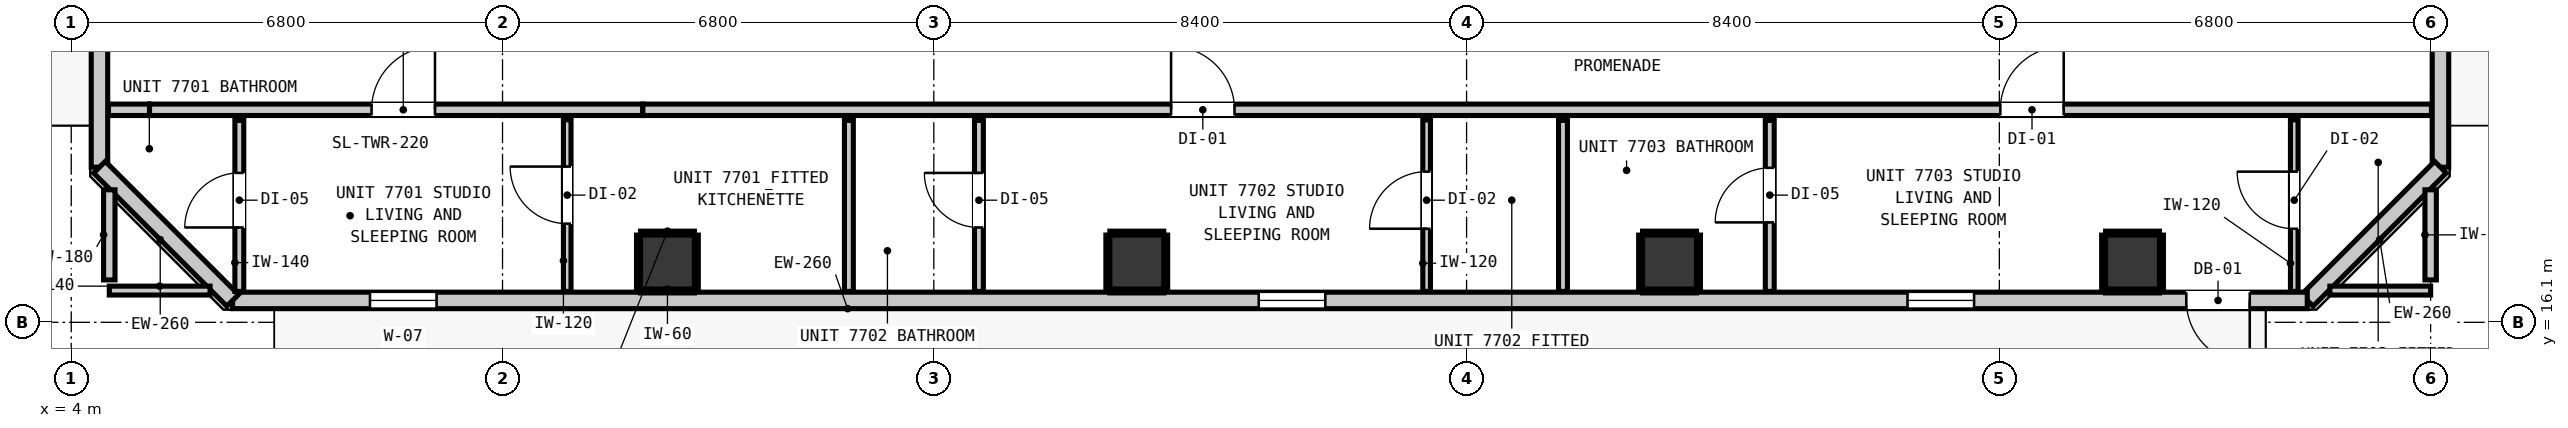
"""IFC4 building model, lengths in metres.
Left out: names, types, materials, properties, quantities, classifications, styles, units other than length and angle.
Written with IfcOpenShell. Run it as: python <this file> out.ifc"""

import sys

from ifc_helpers import new_model, si_unit, direction, frame, frame_2d, origin, origin_2d, place, context, subcontext, project, spatial, rectangle, extrude, element, fill, save


model = new_model("IFC4")
c1 = context("Model", 3, precision=1e-05, world=origin(), true_north=direction((0.0, 1.0)))
c2 = subcontext(c1, "Body", "Model", "MODEL_VIEW")
j1 = project(units=[si_unit("LENGTHUNIT", "METRE"), si_unit("PLANEANGLEUNIT", "RADIAN")], contexts=[c1])
p1 = place(None, origin())
s1 = spatial("IfcSite", under=j1, at=p1, CompositionType="ELEMENT")
p2 = place(p1, origin())
s2 = spatial("IfcBuilding", under=s1, at=p2, CompositionType="ELEMENT")
p3 = place(p2, frame((0.0, 0.0, 265.56)))
s3 = spatial("IfcBuildingStorey", under=s2, at=p3, CompositionType="ELEMENT", Elevation=265.56)
for number, where, z_axis, x_axis in (
    (1, (13.4, 17.05, 0.0), (0.0, 0.0, 1.0), (1.0, 0.0, 0.0)),
    (2, (20.8, 17.05, 0.0), (0.0, 0.0, 1.0), (1.0, 0.0, 0.0)),
    (3, (29.2, 17.05, 0.0), (0.0, 0.0, 1.0), (1.0, 0.0, 0.0)),
    (4, (36.5, 17.05, 0.0), (0.0, 0.0, 1.0), (1.0, 0.0, 0.0)),
):
    element("IfcColumn", number, at=place(p3, frame(where, z_axis=z_axis, x_axis=x_axis)), inside=s3, PredefinedType="COLUMN", context=c2, shape_type="SweptSolid", body=[
        extrude(rectangle(XDim=0.85, YDim=0.85, at=origin_2d()), origin(), (0.0, 0.0, 1.0), 3.32),
    ])
p4 = place(p3, frame((4.445, 18.545, 0.0), z_axis=(0.0, 0.0, 1.0), x_axis=(0.0, 1.0, 0.0)))
e5 = element("IfcWall", 5, at=p4, inside=s3, PredefinedType="STANDARD", context=c2, shape_type="SweptSolid", body=[
    extrude(rectangle(XDim=30.31, YDim=0.26, at=frame_2d((15.155, 0.0))), origin(), (0.0, 0.0, 1.0), 3.1),
])
p5 = place(p4, frame((4.434, 0.0, 0.0)))
e6 = element("IfcOpeningElement", 6, at=p5, cuts=e5, PredefinedType="OPENING", context=c2, shape_type="SweptSolid", body=[
    extrude(rectangle(XDim=1.0, YDim=2.15, at=frame_2d((0.5, 1.075))), frame((0.0, 0.14, 0.0), z_axis=(0.0, -1.0, 0.0), x_axis=(1.0, 0.0, 0.0)), (0.0, 0.0, 1.0), 0.28),
])
p6 = place(p4, frame((28.241, 0.0, 0.85)))
e7 = element("IfcOpeningElement", 7, at=p6, cuts=e5, PredefinedType="OPENING", context=c2, shape_type="SweptSolid", body=[
    extrude(rectangle(XDim=1.05, YDim=1.65, at=frame_2d((0.525, 0.825))), frame((0.0, 0.14, 0.0), z_axis=(0.0, -1.0, 0.0), x_axis=(1.0, 0.0, 0.0)), (0.0, 0.0, 1.0), 0.28),
])
p7 = place(p4, frame((15.98, 0.0, 0.85)))
e8 = element("IfcOpeningElement", 8, at=p7, cuts=e5, PredefinedType="OPENING", context=c2, shape_type="SweptSolid", body=[
    extrude(rectangle(XDim=1.05, YDim=1.65, at=frame_2d((0.525, 0.825))), frame((0.0, 0.14, 0.0), z_axis=(0.0, -1.0, 0.0), x_axis=(1.0, 0.0, 0.0)), (0.0, 0.0, 1.0), 0.28),
])
p8 = place(p3, frame((41.355, 48.855, 0.0), z_axis=(0.0, 0.0, 1.0), x_axis=(0.0, -1.0, 0.0)))
e9 = element("IfcWall", 9, at=p8, inside=s3, PredefinedType="STANDARD", context=c2, shape_type="SweptSolid", body=[
    extrude(rectangle(XDim=30.31, YDim=0.26, at=frame_2d((15.155, 0.0))), origin(), (0.0, 0.0, 1.0), 3.1),
])
p9 = place(p8, frame((0.91, 0.0, 0.0)))
e10 = element("IfcOpeningElement", 10, at=p9, cuts=e9, PredefinedType="OPENING", context=c2, shape_type="SweptSolid", body=[
    extrude(rectangle(XDim=1.0, YDim=2.15, at=frame_2d((0.5, 1.075))), frame((0.0, 0.14, 0.0), z_axis=(0.0, -1.0, 0.0), x_axis=(1.0, 0.0, 0.0)), (0.0, 0.0, 1.0), 0.28),
])
p10 = place(p8, frame((3.932, 0.0, 0.85)))
e11 = element("IfcOpeningElement", 11, at=p10, cuts=e9, PredefinedType="OPENING", context=c2, shape_type="SweptSolid", body=[
    extrude(rectangle(XDim=1.05, YDim=1.65, at=frame_2d((0.525, 0.825))), frame((0.0, 0.14, 0.0), z_axis=(0.0, -1.0, 0.0), x_axis=(1.0, 0.0, 0.0)), (0.0, 0.0, 1.0), 0.28),
])
p11 = place(p3, frame((41.355, 18.545, 0.0), z_axis=(0.0, 0.0, 1.0), x_axis=(-0.707147883682, -0.707065676302, 0.0)))
e12 = element("IfcWall", 12, at=p11, inside=s3, PredefinedType="STANDARD", context=c2, shape_type="SweptSolid", body=[
    extrude(rectangle(XDim=2.97, YDim=0.26, at=frame_2d((1.485, 0.0))), origin(), (0.0, 0.0, 1.0), 3.1),
])
p12 = place(p3, frame((39.255, 16.445, 0.0), z_axis=(0.0, 0.0, 1.0), x_axis=(-1.0, 0.0, 0.0)))
e13 = element("IfcWall", 13, at=p12, inside=s3, PredefinedType="STANDARD", context=c2, shape_type="SweptSolid", body=[
    extrude(rectangle(XDim=32.71, YDim=0.26, at=frame_2d((16.355, 0.0))), origin(), (0.0, 0.0, 1.0), 3.1),
])
p13 = place(p12, frame((0.907, 0.0, 0.0)))
e14 = element("IfcOpeningElement", 14, at=p13, cuts=e13, PredefinedType="OPENING", context=c2, shape_type="SweptSolid", body=[
    extrude(rectangle(XDim=1.0, YDim=2.15, at=frame_2d((0.5, 1.075))), frame((0.0, 0.14, 0.0), z_axis=(0.0, -1.0, 0.0), x_axis=(1.0, 0.0, 0.0)), (0.0, 0.0, 1.0), 0.28),
])
p14 = place(p12, frame((29.495, 0.0, 0.85)))
e15 = element("IfcOpeningElement", 15, at=p14, cuts=e13, PredefinedType="OPENING", context=c2, shape_type="SweptSolid", body=[
    extrude(rectangle(XDim=1.05, YDim=1.65, at=frame_2d((0.525, 0.825))), frame((0.0, 0.14, 0.0), z_axis=(0.0, -1.0, 0.0), x_axis=(1.0, 0.0, 0.0)), (0.0, 0.0, 1.0), 0.28),
])
p15 = place(p12, frame((15.482, 0.0, 0.85)))
e16 = element("IfcOpeningElement", 16, at=p15, cuts=e13, PredefinedType="OPENING", context=c2, shape_type="SweptSolid", body=[
    extrude(rectangle(XDim=1.05, YDim=1.65, at=frame_2d((0.525, 0.825))), frame((0.0, 0.14, 0.0), z_axis=(0.0, -1.0, 0.0), x_axis=(1.0, 0.0, 0.0)), (0.0, 0.0, 1.0), 0.28),
])
p16 = place(p12, frame((5.253, 0.0, 0.85)))
e17 = element("IfcOpeningElement", 17, at=p16, cuts=e13, PredefinedType="OPENING", context=c2, shape_type="SweptSolid", body=[
    extrude(rectangle(XDim=1.05, YDim=1.65, at=frame_2d((0.525, 0.825))), frame((0.0, 0.14, 0.0), z_axis=(0.0, -1.0, 0.0), x_axis=(1.0, 0.0, 0.0)), (0.0, 0.0, 1.0), 0.28),
])
p17 = place(p3, frame((6.545, 16.445, 0.0), z_axis=(0.0, 0.0, 1.0), x_axis=(-0.707106781187, 0.707106781187, 0.0)))
e18 = element("IfcWall", 18, at=p17, inside=s3, PredefinedType="STANDARD", context=c2, shape_type="SweptSolid", body=[
    extrude(rectangle(XDim=2.97, YDim=0.26, at=frame_2d((1.485, 0.0))), origin(), (0.0, 0.0, 1.0), 3.1),
])
p18 = place(p3, frame((4.587, 19.45, 0.0), z_axis=(0.0, 0.0, 1.0), x_axis=(1.0, 0.0, 0.0)))
e19 = element("IfcWall", 19, at=p18, inside=s3, PredefinedType="PARTITIONING", context=c2, shape_type="SweptSolid", body=[
    extrude(rectangle(XDim=0.647, YDim=0.18, at=frame_2d((0.323, 0.0))), origin(), (0.0, 0.0, 1.0), 3.1),
])
p19 = place(p3, frame((5.234, 19.45, 0.0), z_axis=(0.0, 0.0, 1.0), x_axis=(1.0, 0.0, 0.0)))
e20 = element("IfcWall", 20, at=p19, inside=s3, PredefinedType="PARTITIONING", context=c2, shape_type="SweptSolid", body=[
    extrude(rectangle(XDim=7.778, YDim=0.18, at=frame_2d((3.889, 0.0))), origin(), (0.0, 0.0, 1.0), 2.477),
])
p20 = place(p19, frame((3.501, 0.0, 0.0)))
e21 = element("IfcOpeningElement", 21, at=p20, cuts=e20, PredefinedType="OPENING", context=c2, shape_type="SweptSolid", body=[
    extrude(rectangle(XDim=1.0, YDim=2.15, at=frame_2d((0.5, 1.075))), frame((0.0, 0.1, 0.0), z_axis=(0.0, -1.0, 0.0), x_axis=(1.0, 0.0, 0.0)), (0.0, 0.0, 1.0), 0.2),
])
p21 = place(p3, frame((13.012, 19.45, 0.0), z_axis=(0.0, 0.0, 1.0), x_axis=(1.0, 0.0, 0.0)))
e22 = element("IfcWall", 22, at=p21, inside=s3, PredefinedType="PARTITIONING", context=c2, shape_type="SweptSolid", body=[
    extrude(rectangle(XDim=28.201, YDim=0.18, at=frame_2d((14.101, 0.0))), origin(), (0.0, 0.0, 1.0), 3.1),
])
p22 = place(p21, frame((8.329, 0.0, 0.0)))
e23 = element("IfcOpeningElement", 23, at=p22, cuts=e22, PredefinedType="OPENING", context=c2, shape_type="SweptSolid", body=[
    extrude(rectangle(XDim=1.0, YDim=2.15, at=frame_2d((0.5, 1.075))), frame((0.0, 0.1, 0.0), z_axis=(0.0, -1.0, 0.0), x_axis=(1.0, 0.0, 0.0)), (0.0, 0.0, 1.0), 0.2),
])
p23 = place(p21, frame((21.403, 0.0, 0.0)))
e24 = element("IfcOpeningElement", 24, at=p23, cuts=e22, PredefinedType="OPENING", context=c2, shape_type="SweptSolid", body=[
    extrude(rectangle(XDim=1.0, YDim=2.15, at=frame_2d((0.5, 1.075))), frame((0.0, 0.1, 0.0), z_axis=(0.0, -1.0, 0.0), x_axis=(1.0, 0.0, 0.0)), (0.0, 0.0, 1.0), 0.2),
])
for number, where, z_axis, x_axis in (
    (25, (4.6, 16.6, 0.0), (0.0, 0.0, 1.0), (1.0, 0.0, 0.0)),
    (26, (39.611, 16.6, 0.0), (0.0, 0.0, 1.0), (1.0, 0.0, 0.0)),
):
    element("IfcWall", number, at=place(p3, frame(where, z_axis=z_axis, x_axis=x_axis)), inside=s3, PredefinedType="PARTITIONING", context=c2, shape_type="SweptSolid", body=[
        extrude(rectangle(XDim=1.589, YDim=0.14, at=frame_2d((0.794, 0.0))), origin(), (0.0, 0.0, 1.0), 3.1),
    ])
for number, where, z_axis, x_axis in (
    (27, (4.6, 16.768, 0.0), (0.0, 0.0, 1.0), (0.0, 1.0, 0.0)),
    (28, (41.2, 16.768, 0.0), (0.0, 0.0, 1.0), (0.0, 1.0, 0.0)),
):
    element("IfcWall", number, at=place(p3, frame(where, z_axis=z_axis, x_axis=x_axis)), inside=s3, PredefinedType="PARTITIONING", context=c2, shape_type="SweptSolid", body=[
        extrude(rectangle(XDim=1.421, YDim=0.18, at=frame_2d((0.71, 0.0))), origin(), (0.0, 0.0, 1.0), 3.1),
    ])
p24 = place(p3, frame((6.65, 16.587, 0.0), z_axis=(0.0, 0.0, 1.0), x_axis=(0.0, 1.0, 0.0)))
e29 = element("IfcWall", 29, at=p24, inside=s3, PredefinedType="PARTITIONING", context=c2, shape_type="SweptSolid", body=[
    extrude(rectangle(XDim=2.695, YDim=0.14, at=frame_2d((1.348, 0.0))), origin(), (0.0, 0.0, 1.0), 3.1),
])
p25 = place(p24, frame((1.008, 0.0, 0.0)))
e30 = element("IfcOpeningElement", 30, at=p25, cuts=e29, PredefinedType="OPENING", context=c2, shape_type="SweptSolid", body=[
    extrude(rectangle(XDim=0.86, YDim=2.02, at=frame_2d((0.43, 1.01))), frame((0.0, 0.08, 0.0), z_axis=(0.0, -1.0, 0.0), x_axis=(1.0, 0.0, 0.0)), (0.0, 0.0, 1.0), 0.16),
])
p26 = place(p3, frame((16.261, 16.587, 0.0), z_axis=(0.0, 0.0, 1.0), x_axis=(0.0, 1.0, 0.0)))
e31 = element("IfcWall", 31, at=p26, inside=s3, PredefinedType="PARTITIONING", context=c2, shape_type="SweptSolid", body=[
    extrude(rectangle(XDim=2.695, YDim=0.14, at=frame_2d((1.348, 0.0))), origin(), (0.0, 0.0, 1.0), 3.1),
])
p27 = place(p3, frame((18.311, 16.587, 0.0), z_axis=(0.0, 0.0, 1.0), x_axis=(0.0, 1.0, 0.0)))
e32 = element("IfcWall", 32, at=p27, inside=s3, PredefinedType="PARTITIONING", context=c2, shape_type="SweptSolid", body=[
    extrude(rectangle(XDim=2.695, YDim=0.14, at=frame_2d((1.348, 0.0))), origin(), (0.0, 0.0, 1.0), 3.1),
])
p28 = place(p27, frame((1.008, 0.0, 0.0)))
e33 = element("IfcOpeningElement", 33, at=p28, cuts=e32, PredefinedType="OPENING", context=c2, shape_type="SweptSolid", body=[
    extrude(rectangle(XDim=0.86, YDim=2.02, at=frame_2d((0.43, 1.01))), frame((0.0, 0.08, 0.0), z_axis=(0.0, -1.0, 0.0), x_axis=(1.0, 0.0, 0.0)), (0.0, 0.0, 1.0), 0.16),
])
p29 = place(p3, frame((27.52, 16.587, 0.0), z_axis=(0.0, 0.0, 1.0), x_axis=(0.0, 1.0, 0.0)))
e34 = element("IfcWall", 34, at=p29, inside=s3, PredefinedType="PARTITIONING", context=c2, shape_type="SweptSolid", body=[
    extrude(rectangle(XDim=2.695, YDim=0.14, at=frame_2d((1.348, 0.0))), origin(), (0.0, 0.0, 1.0), 3.1),
])
p30 = place(p3, frame((30.78, 16.587, 0.0), z_axis=(0.0, 0.0, 1.0), x_axis=(0.0, 1.0, 0.0)))
e35 = element("IfcWall", 35, at=p30, inside=s3, PredefinedType="PARTITIONING", context=c2, shape_type="SweptSolid", body=[
    extrude(rectangle(XDim=2.695, YDim=0.14, at=frame_2d((1.348, 0.0))), origin(), (0.0, 0.0, 1.0), 3.1),
])
p31 = place(p30, frame((1.088, 0.0, 0.0)))
e36 = element("IfcOpeningElement", 36, at=p31, cuts=e35, PredefinedType="OPENING", context=c2, shape_type="SweptSolid", body=[
    extrude(rectangle(XDim=0.86, YDim=2.02, at=frame_2d((0.43, 1.01))), frame((0.0, 0.08, 0.0), z_axis=(0.0, -1.0, 0.0), x_axis=(1.0, 0.0, 0.0)), (0.0, 0.0, 1.0), 0.16),
])
p32 = place(p3, frame((11.82, 16.587, 0.0), z_axis=(0.0, 0.0, 1.0), x_axis=(0.0, 1.0, 0.0)))
e37 = element("IfcWall", 37, at=p32, inside=s3, PredefinedType="PARTITIONING", context=c2, shape_type="SweptSolid", body=[
    extrude(rectangle(XDim=2.705, YDim=0.12, at=frame_2d((1.353, 0.0))), origin(), (0.0, 0.0, 1.0), 3.1),
])
p33 = place(p32, frame((1.068, 0.0, 0.0)))
e38 = element("IfcOpeningElement", 38, at=p33, cuts=e37, PredefinedType="OPENING", context=c2, shape_type="SweptSolid", body=[
    extrude(rectangle(XDim=0.9, YDim=2.1, at=frame_2d((0.45, 1.05))), frame((0.0, 0.07, 0.0), z_axis=(0.0, -1.0, 0.0), x_axis=(1.0, 0.0, 0.0)), (0.0, 0.0, 1.0), 0.14),
])
p34 = place(p3, frame((25.37, 16.587, 0.0), z_axis=(0.0, 0.0, 1.0), x_axis=(0.0, 1.0, 0.0)))
e39 = element("IfcWall", 39, at=p34, inside=s3, PredefinedType="PARTITIONING", context=c2, shape_type="SweptSolid", body=[
    extrude(rectangle(XDim=2.705, YDim=0.12, at=frame_2d((1.353, 0.0))), origin(), (0.0, 0.0, 1.0), 3.1),
])
p35 = place(p34, frame((0.988, 0.0, 0.0)))
e40 = element("IfcOpeningElement", 40, at=p35, cuts=e39, PredefinedType="OPENING", context=c2, shape_type="SweptSolid", body=[
    extrude(rectangle(XDim=0.9, YDim=2.1, at=frame_2d((0.45, 1.05))), frame((0.0, 0.07, 0.0), z_axis=(0.0, -1.0, 0.0), x_axis=(1.0, 0.0, 0.0)), (0.0, 0.0, 1.0), 0.14),
])
p36 = place(p3, frame((39.05, 16.587, 0.0), z_axis=(0.0, 0.0, 1.0), x_axis=(0.0, 1.0, 0.0)))
e41 = element("IfcWall", 41, at=p36, inside=s3, PredefinedType="PARTITIONING", context=c2, shape_type="SweptSolid", body=[
    extrude(rectangle(XDim=2.705, YDim=0.12, at=frame_2d((1.353, 0.0))), origin(), (0.0, 0.0, 1.0), 3.1),
])
p37 = place(p36, frame((0.988, 0.0, 0.0)))
e42 = element("IfcOpeningElement", 42, at=p37, cuts=e41, PredefinedType="OPENING", context=c2, shape_type="SweptSolid", body=[
    extrude(rectangle(XDim=0.9, YDim=2.1, at=frame_2d((0.45, 1.05))), frame((0.0, 0.07, 0.0), z_axis=(0.0, -1.0, 0.0), x_axis=(1.0, 0.0, 0.0)), (0.0, 0.0, 1.0), 0.14),
])
for number, where, z_axis, x_axis in (
    (43, (12.975, 16.593, 0.0), (0.0, 0.0, 1.0), (1.0, 0.0, 0.0)),
    (44, (12.975, 17.507, 0.0), (0.0, 0.0, 1.0), (1.0, 0.0, 0.0)),
):
    element("IfcWall", number, at=place(p3, frame(where, z_axis=z_axis, x_axis=x_axis)), inside=s3, PredefinedType="PARTITIONING", context=c2, shape_type="SweptSolid", body=[
        extrude(rectangle(XDim=0.85, YDim=0.06, at=frame_2d((0.425, 0.0))), origin(), (0.0, 0.0, 1.0), 1.45),
    ])
for number, where, z_axis, x_axis in (
    (45, (12.943, 16.625, 0.0), (0.0, 0.0, 1.0), (0.0, 1.0, 0.0)),
    (46, (13.857, 16.625, 0.0), (0.0, 0.0, 1.0), (0.0, 1.0, 0.0)),
    (47, (20.375, 16.593, 0.0), (0.0, 0.0, 1.0), (1.0, 0.0, 0.0)),
    (48, (20.375, 17.507, 0.0), (0.0, 0.0, 1.0), (1.0, 0.0, 0.0)),
    (49, (20.343, 16.625, 0.0), (0.0, 0.0, 1.0), (0.0, 1.0, 0.0)),
    (50, (21.257, 16.625, 0.0), (0.0, 0.0, 1.0), (0.0, 1.0, 0.0)),
    (51, (28.775, 16.593, 0.0), (0.0, 0.0, 1.0), (1.0, 0.0, 0.0)),
    (52, (28.775, 17.507, 0.0), (0.0, 0.0, 1.0), (1.0, 0.0, 0.0)),
    (53, (28.743, 16.625, 0.0), (0.0, 0.0, 1.0), (0.0, 1.0, 0.0)),
    (54, (29.657, 16.625, 0.0), (0.0, 0.0, 1.0), (0.0, 1.0, 0.0)),
    (55, (36.075, 16.593, 0.0), (0.0, 0.0, 1.0), (1.0, 0.0, 0.0)),
    (56, (36.075, 17.507, 0.0), (0.0, 0.0, 1.0), (1.0, 0.0, 0.0)),
    (57, (36.043, 16.625, 0.0), (0.0, 0.0, 1.0), (0.0, 1.0, 0.0)),
    (58, (36.957, 16.625, 0.0), (0.0, 0.0, 1.0), (0.0, 1.0, 0.0)),
):
    element("IfcWall", number, at=place(p3, frame(where, z_axis=z_axis, x_axis=x_axis)), inside=s3, PredefinedType="PARTITIONING", context=c2, shape_type="SweptSolid", body=[
        extrude(rectangle(XDim=0.85, YDim=0.06, at=frame_2d((0.425, 0.0))), origin(), (0.0, 0.0, 1.0), 1.45),
    ])
p38 = place(p13, origin())
e59 = element("IfcDoor", 59, at=p38, inside=s3, OperationType="SINGLE_SWING_LEFT", PredefinedType="DOOR", context=c2, shape_type="SweptSolid", body=[
    extrude(rectangle(XDim=1.0, YDim=2.15, at=frame_2d((0.5, 1.075))), frame((0.0, 0.025, 0.0), z_axis=(0.0, -1.0, 0.0), x_axis=(1.0, 0.0, 0.0)), (0.0, 0.0, 1.0), 0.05),
])
fill(e14, e59)
p39 = place(p14, origin())
e60 = element("IfcWindow", 60, at=p39, inside=s3, PartitioningType="SINGLE_PANEL", PredefinedType="WINDOW", context=c2, shape_type="SweptSolid", body=[
    extrude(rectangle(XDim=1.05, YDim=1.65, at=frame_2d((0.525, 0.825))), frame((0.0, 0.03, 0.0), z_axis=(0.0, -1.0, 0.0), x_axis=(1.0, 0.0, 0.0)), (0.0, 0.0, 1.0), 0.06),
])
fill(e15, e60)
p40 = place(p15, origin())
e61 = element("IfcWindow", 61, at=p40, inside=s3, PartitioningType="SINGLE_PANEL", PredefinedType="WINDOW", context=c2, shape_type="SweptSolid", body=[
    extrude(rectangle(XDim=1.05, YDim=1.65, at=frame_2d((0.525, 0.825))), frame((0.0, 0.03, 0.0), z_axis=(0.0, -1.0, 0.0), x_axis=(1.0, 0.0, 0.0)), (0.0, 0.0, 1.0), 0.06),
])
fill(e16, e61)
p41 = place(p16, origin())
e62 = element("IfcWindow", 62, at=p41, inside=s3, PartitioningType="SINGLE_PANEL", PredefinedType="WINDOW", context=c2, shape_type="SweptSolid", body=[
    extrude(rectangle(XDim=1.05, YDim=1.65, at=frame_2d((0.525, 0.825))), frame((0.0, 0.03, 0.0), z_axis=(0.0, -1.0, 0.0), x_axis=(1.0, 0.0, 0.0)), (0.0, 0.0, 1.0), 0.06),
])
fill(e17, e62)
p42 = place(p20, origin())
e63 = element("IfcDoor", 63, at=p42, inside=s3, OperationType="SINGLE_SWING_RIGHT", PredefinedType="DOOR", context=c2, shape_type="SweptSolid", body=[
    extrude(rectangle(XDim=1.0, YDim=2.15, at=frame_2d((0.5, 1.075))), frame((0.0, 0.025, 0.0), z_axis=(0.0, -1.0, 0.0), x_axis=(1.0, 0.0, 0.0)), (0.0, 0.0, 1.0), 0.05),
])
fill(e21, e63)
p43 = place(p25, origin())
e64 = element("IfcDoor", 64, at=p43, inside=s3, OperationType="SINGLE_SWING_LEFT", PredefinedType="DOOR", context=c2, shape_type="SweptSolid", body=[
    extrude(rectangle(XDim=0.86, YDim=2.02, at=frame_2d((0.43, 1.01))), frame((0.0, 0.025, 0.0), z_axis=(0.0, -1.0, 0.0), x_axis=(1.0, 0.0, 0.0)), (0.0, 0.0, 1.0), 0.05),
])
fill(e30, e64)
p44 = place(p33, origin())
e65 = element("IfcDoor", 65, at=p44, inside=s3, OperationType="SINGLE_SWING_RIGHT", PredefinedType="DOOR", context=c2, shape_type="SweptSolid", body=[
    extrude(rectangle(XDim=0.9, YDim=2.1, at=frame_2d((0.45, 1.05))), frame((0.0, 0.025, 0.0), z_axis=(0.0, -1.0, 0.0), x_axis=(1.0, 0.0, 0.0)), (0.0, 0.0, 1.0), 0.05),
])
fill(e38, e65)
p45 = place(p22, origin())
e66 = element("IfcDoor", 66, at=p45, inside=s3, OperationType="SINGLE_SWING_LEFT", PredefinedType="DOOR", context=c2, shape_type="SweptSolid", body=[
    extrude(rectangle(XDim=1.0, YDim=2.15, at=frame_2d((0.5, 1.075))), frame((0.0, 0.025, 0.0), z_axis=(0.0, -1.0, 0.0), x_axis=(1.0, 0.0, 0.0)), (0.0, 0.0, 1.0), 0.05),
])
fill(e23, e66)
p46 = place(p28, origin())
e67 = element("IfcDoor", 67, at=p46, inside=s3, OperationType="SINGLE_SWING_RIGHT", PredefinedType="DOOR", context=c2, shape_type="SweptSolid", body=[
    extrude(rectangle(XDim=0.86, YDim=2.02, at=frame_2d((0.43, 1.01))), frame((0.0, 0.025, 0.0), z_axis=(0.0, -1.0, 0.0), x_axis=(1.0, 0.0, 0.0)), (0.0, 0.0, 1.0), 0.05),
])
fill(e33, e67)
p47 = place(p35, origin())
e68 = element("IfcDoor", 68, at=p47, inside=s3, OperationType="SINGLE_SWING_LEFT", PredefinedType="DOOR", context=c2, shape_type="SweptSolid", body=[
    extrude(rectangle(XDim=0.9, YDim=2.1, at=frame_2d((0.45, 1.05))), frame((0.0, 0.025, 0.0), z_axis=(0.0, -1.0, 0.0), x_axis=(1.0, 0.0, 0.0)), (0.0, 0.0, 1.0), 0.05),
])
fill(e40, e68)
p48 = place(p23, origin())
e69 = element("IfcDoor", 69, at=p48, inside=s3, OperationType="SINGLE_SWING_RIGHT", PredefinedType="DOOR", context=c2, shape_type="SweptSolid", body=[
    extrude(rectangle(XDim=1.0, YDim=2.15, at=frame_2d((0.5, 1.075))), frame((0.0, 0.025, 0.0), z_axis=(0.0, -1.0, 0.0), x_axis=(1.0, 0.0, 0.0)), (0.0, 0.0, 1.0), 0.05),
])
fill(e24, e69)
p49 = place(p31, origin())
e70 = element("IfcDoor", 70, at=p49, inside=s3, OperationType="SINGLE_SWING_LEFT", PredefinedType="DOOR", context=c2, shape_type="SweptSolid", body=[
    extrude(rectangle(XDim=0.86, YDim=2.02, at=frame_2d((0.43, 1.01))), frame((0.0, 0.025, 0.0), z_axis=(0.0, -1.0, 0.0), x_axis=(1.0, 0.0, 0.0)), (0.0, 0.0, 1.0), 0.05),
])
fill(e36, e70)
p50 = place(p37, origin())
e71 = element("IfcDoor", 71, at=p50, inside=s3, OperationType="SINGLE_SWING_RIGHT", PredefinedType="DOOR", context=c2, shape_type="SweptSolid", body=[
    extrude(rectangle(XDim=0.9, YDim=2.1, at=frame_2d((0.45, 1.05))), frame((0.0, 0.025, 0.0), z_axis=(0.0, -1.0, 0.0), x_axis=(1.0, 0.0, 0.0)), (0.0, 0.0, 1.0), 0.05),
])
fill(e42, e71)
save(model, sys.argv[1])
